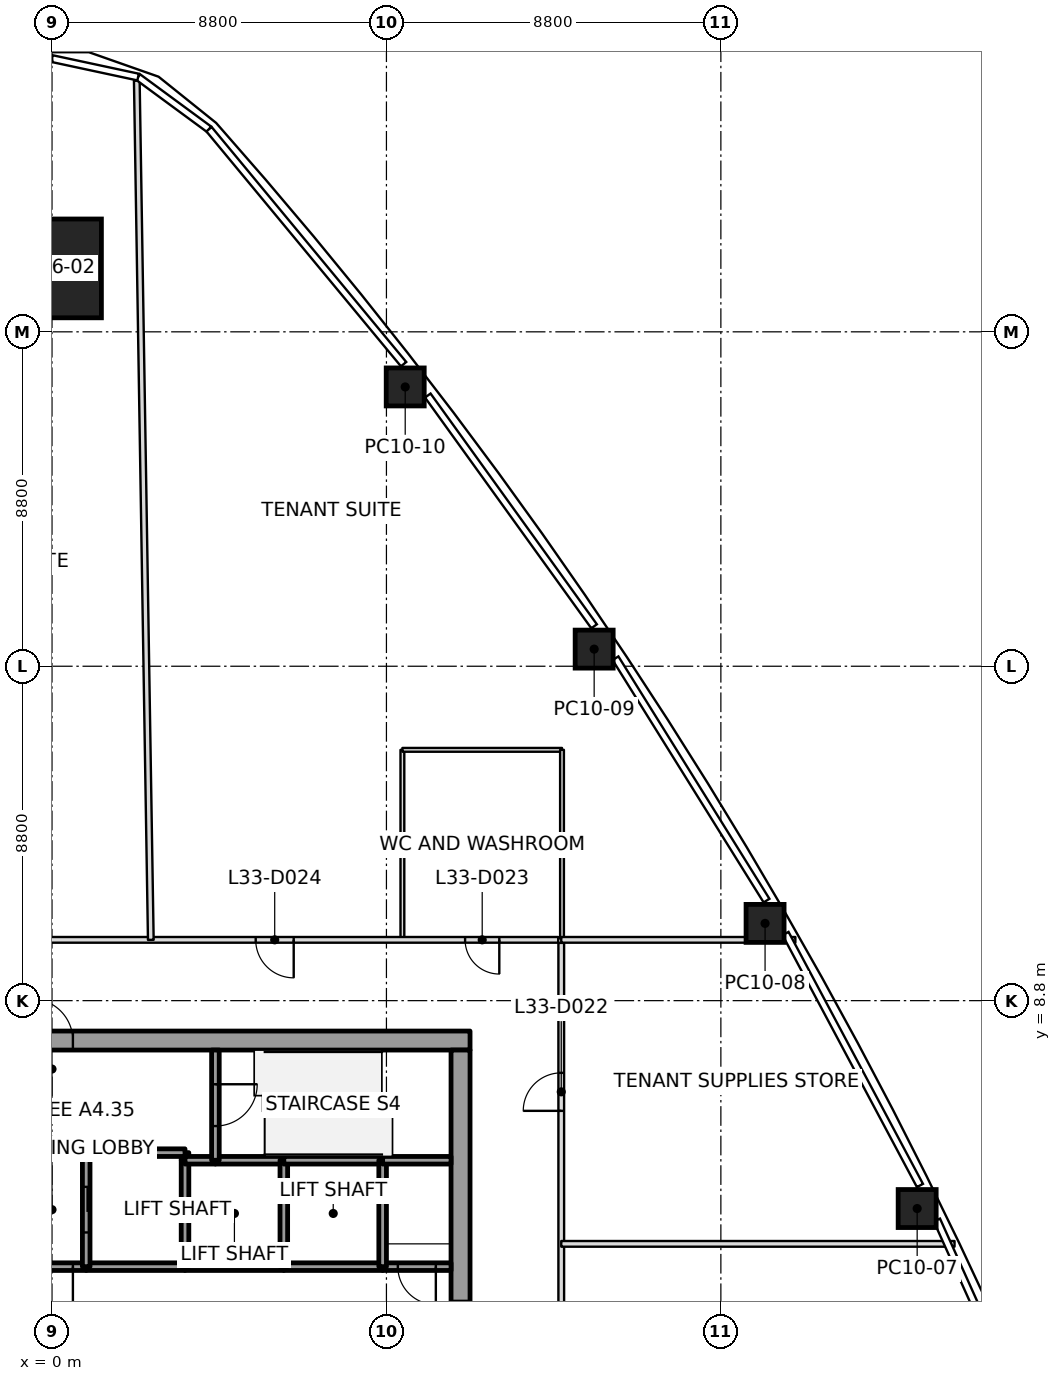
"""IFC4 building model, lengths in metres.
Left out: names, types, materials, properties, quantities, classifications, styles, units other than length and angle.
Written with IfcOpenShell. Run it as: python <this file> out.ifc"""

import sys

from ifc_helpers import new_model, si_unit, direction, frame, frame_2d, origin, origin_2d, place, context, subcontext, project, spatial, rectangle, extrude, element, fill, save


model = new_model("IFC4")
c1 = context("Model", 3, precision=1e-05, world=origin(), true_north=direction((0.0, 1.0)))
c2 = subcontext(c1, "Body", "Model", "MODEL_VIEW")
j1 = project(units=[si_unit("LENGTHUNIT", "METRE"), si_unit("PLANEANGLEUNIT", "RADIAN")], contexts=[c1])
p1 = place(None, origin())
s1 = spatial("IfcSite", under=j1, at=p1, CompositionType="ELEMENT")
p2 = place(p1, origin())
s2 = spatial("IfcBuilding", under=s1, at=p2, CompositionType="ELEMENT")
p3 = place(p2, frame((0.0, 0.0, 153.8)))
s3 = spatial("IfcBuildingStorey", under=s2, at=p3, CompositionType="ELEMENT", Elevation=153.8)
p4 = place(p3, frame((0.0, 28.069, 0.0), z_axis=(0.0, -0.032453598962, 0.999473243221), x_axis=(1.0, 0.0, 0.0)))
e1 = element("IfcColumn", 1, at=p4, inside=s3, PredefinedType="COLUMN", context=c2, shape_type="SweptSolid", body=[
    extrude(rectangle(XDim=2.6, YDim=2.6, at=origin_2d()), origin(), (0.0, 0.0, 1.0), 4.002),
])
p5 = place(p3, frame((22.765, 3.329, 0.0), z_axis=(-0.014097689605, 0.002074984617, 0.999898469639), x_axis=(-0.440645983908, 0.897644641837, -0.00807550904)))
e2 = element("IfcColumn", 2, at=p5, inside=s3, PredefinedType="COLUMN", context=c2, shape_type="SweptSolid", body=[
    extrude(rectangle(XDim=1.0, YDim=1.0, at=origin_2d()), origin(), (0.0, 0.0, 1.0), 4.0),
])
p6 = place(p3, frame((18.763, 10.833, 0.0), z_axis=(-0.009948074445, -0.005736926367, 0.999934059571), x_axis=(-0.499975258342, 0.8660396879, -5.385525e-06)))
e3 = element("IfcColumn", 3, at=p6, inside=s3, PredefinedType="COLUMN", context=c2, shape_type="SweptSolid", body=[
    extrude(rectangle(XDim=1.0, YDim=1.0, at=origin_2d()), origin(), (0.0, 0.0, 1.0), 4.0),
])
p7 = place(p3, frame((14.266, 18.051, 0.0), z_axis=(-0.005248490815, -0.013243284963, 0.999898529226), x_axis=(-0.557043340831, 0.830444164861, 0.008074991239)))
e4 = element("IfcColumn", 4, at=p7, inside=s3, PredefinedType="COLUMN", context=c2, shape_type="SweptSolid", body=[
    extrude(rectangle(XDim=1.0, YDim=1.0, at=origin_2d()), origin(), (0.0, 0.0, 1.0), 4.0),
])
p8 = place(p3, frame((9.294, 24.95, 0.0), z_axis=(-0.000183066973, -0.020503501027, 0.999789764367), x_axis=(-0.611585028009, 0.79101467846, 0.016109996147)))
e5 = element("IfcColumn", 5, at=p8, inside=s3, PredefinedType="COLUMN", context=c2, shape_type="SweptSolid", body=[
    extrude(rectangle(XDim=1.0, YDim=1.0, at=origin_2d()), origin(), (0.0, 0.0, 1.0), 4.001),
])
p9 = place(p3, frame((-11.0, 7.75, 0.0), z_axis=(0.0, 0.0, 1.0), x_axis=(1.0, 0.0, 0.0)))
e6 = element("IfcWall", 6, at=p9, inside=s3, PredefinedType="SHEAR", context=c2, shape_type="SweptSolid", body=[
    extrude(rectangle(XDim=22.0, YDim=0.5, at=frame_2d((11.0, 0.0))), origin(), (0.0, 0.0, 1.0), 4.0),
])
p10 = place(p9, frame((10.45, 0.0, 0.0)))
e7 = element("IfcOpeningElement", 7, at=p10, cuts=e6, PredefinedType="OPENING", context=c2, shape_type="SweptSolid", body=[
    extrude(rectangle(XDim=1.1, YDim=2.1, at=frame_2d((0.55, 1.05))), frame((0.0, 0.25, 0.0), z_axis=(0.0, -1.0, 0.0), x_axis=(1.0, 0.0, 0.0)), (0.0, 0.0, 1.0), 0.5),
])
p11 = place(p3, frame((10.75, -7.5, 0.0), z_axis=(0.0, 0.0, 1.0), x_axis=(0.0, 1.0, 0.0)))
e8 = element("IfcWall", 8, at=p11, inside=s3, PredefinedType="SHEAR", context=c2, shape_type="SweptSolid", body=[
    extrude(rectangle(XDim=15.0, YDim=0.5, at=frame_2d((7.5, 0.0))), origin(), (0.0, 0.0, 1.0), 4.0),
])
p12 = place(p11, frame((6.6, 0.0, 0.0)))
e9 = element("IfcOpeningElement", 9, at=p12, cuts=e8, PredefinedType="OPENING", context=c2, shape_type="SweptSolid", body=[
    extrude(rectangle(XDim=1.8, YDim=2.1, at=frame_2d((0.9, 1.05))), frame((0.0, 0.25, 0.0), z_axis=(0.0, -1.0, 0.0), x_axis=(1.0, 0.0, 0.0)), (0.0, 0.0, 1.0), 0.5),
])
p13 = place(p3, frame((0.9, 1.8, 0.0), z_axis=(0.0, 0.0, 1.0), x_axis=(-1.0, 0.0, 0.0)))
e10 = element("IfcWall", 10, at=p13, inside=s3, PredefinedType="SOLIDWALL", context=c2, shape_type="SweptSolid", body=[
    extrude(rectangle(XDim=1.8, YDim=0.2, at=frame_2d((0.9, 0.0))), origin(), (0.0, 0.0, 1.0), 3.85),
])
p14 = place(p13, frame((0.35, 0.0, 0.0)))
e11 = element("IfcOpeningElement", 11, at=p14, cuts=e10, PredefinedType="OPENING", context=c2, shape_type="SweptSolid", body=[
    extrude(rectangle(XDim=1.1, YDim=2.1, at=frame_2d((0.55, 1.05))), frame((0.0, 0.1, 0.0), z_axis=(0.0, -1.0, 0.0), x_axis=(1.0, 0.0, 0.0)), (0.0, 0.0, 1.0), 0.2),
])
p15 = place(p3, frame((3.5, 1.8, 0.0), z_axis=(0.0, 0.0, 1.0), x_axis=(-1.0, 0.0, 0.0)))
e12 = element("IfcWall", 12, at=p15, inside=s3, PredefinedType="SOLIDWALL", context=c2, shape_type="SweptSolid", body=[
    extrude(rectangle(XDim=2.6, YDim=0.2, at=frame_2d((1.3, 0.0))), origin(), (0.0, 0.0, 1.0), 3.85),
])
p16 = place(p3, frame((3.5, 4.6, 0.0), z_axis=(0.0, 0.0, 1.0), x_axis=(0.0, 1.0, 0.0)))
e13 = element("IfcWall", 13, at=p16, inside=s3, PredefinedType="SOLIDWALL", context=c2, shape_type="SweptSolid", body=[
    extrude(rectangle(XDim=0.2, YDim=0.2, at=frame_2d((0.1, 0.0))), origin(), (0.0, 0.0, 1.0), 3.85),
])
p17 = place(p3, frame((3.5, 4.8, 0.0), z_axis=(0.0, 0.0, 1.0), x_axis=(-1.0, 0.0, 0.0)))
e14 = element("IfcWall", 14, at=p17, inside=s3, PredefinedType="SOLIDWALL", context=c2, shape_type="SweptSolid", body=[
    extrude(rectangle(XDim=2.6, YDim=0.2, at=frame_2d((1.3, 0.0))), origin(), (0.0, 0.0, 1.0), 3.85),
])
p18 = place(p3, frame((0.9, 4.8, 0.0), z_axis=(0.0, 0.0, 1.0), x_axis=(0.0, -1.0, 0.0)))
e15 = element("IfcWall", 15, at=p18, inside=s3, PredefinedType="SOLIDWALL", context=c2, shape_type="SweptSolid", body=[
    extrude(rectangle(XDim=3.0, YDim=0.2, at=frame_2d((1.5, 0.0))), origin(), (0.0, 0.0, 1.0), 3.85),
])
p19 = place(p18, frame((0.9, 0.0, 0.0)))
e16 = element("IfcOpeningElement", 16, at=p19, cuts=e15, PredefinedType="OPENING", context=c2, shape_type="SweptSolid", body=[
    extrude(rectangle(XDim=1.2, YDim=2.1, at=frame_2d((0.6, 1.05))), frame((0.0, 0.1, 0.0), z_axis=(0.0, -1.0, 0.0), x_axis=(1.0, 0.0, 0.0)), (0.0, 0.0, 1.0), 0.2),
])
p20 = place(p3, frame((6.1, 1.8, 0.0), z_axis=(0.0, 0.0, 1.0), x_axis=(-1.0, 0.0, 0.0)))
e17 = element("IfcWall", 17, at=p20, inside=s3, PredefinedType="SOLIDWALL", context=c2, shape_type="SweptSolid", body=[
    extrude(rectangle(XDim=2.6, YDim=0.2, at=frame_2d((1.3, 0.0))), origin(), (0.0, 0.0, 1.0), 3.85),
])
p21 = place(p3, frame((3.5, 1.8, 0.0), z_axis=(0.0, 0.0, 1.0), x_axis=(0.0, 1.0, 0.0)))
e18 = element("IfcWall", 18, at=p21, inside=s3, PredefinedType="SOLIDWALL", context=c2, shape_type="SweptSolid", body=[
    extrude(rectangle(XDim=2.8, YDim=0.2, at=frame_2d((1.4, 0.0))), origin(), (0.0, 0.0, 1.0), 3.85),
])
p22 = place(p3, frame((4.3, 4.6, 0.0), z_axis=(0.0, 0.0, 1.0), x_axis=(-1.0, 0.0, 0.0)))
e19 = element("IfcWall", 19, at=p22, inside=s3, PredefinedType="SOLIDWALL", context=c2, shape_type="SweptSolid", body=[
    extrude(rectangle(XDim=0.8, YDim=0.2, at=frame_2d((0.4, 0.0))), origin(), (0.0, 0.0, 1.0), 3.85),
])
p23 = place(p3, frame((6.1, 4.6, 0.0), z_axis=(0.0, 0.0, 1.0), x_axis=(-1.0, 0.0, 0.0)))
e20 = element("IfcWall", 20, at=p23, inside=s3, PredefinedType="SOLIDWALL", context=c2, shape_type="SweptSolid", body=[
    extrude(rectangle(XDim=1.8, YDim=0.2, at=frame_2d((0.9, 0.0))), origin(), (0.0, 0.0, 1.0), 3.85),
])
p24 = place(p3, frame((4.3, 7.5, 0.0), z_axis=(0.0, 0.0, 1.0), x_axis=(0.0, -1.0, 0.0)))
e21 = element("IfcWall", 21, at=p24, inside=s3, PredefinedType="SOLIDWALL", context=c2, shape_type="SweptSolid", body=[
    extrude(rectangle(XDim=2.9, YDim=0.2, at=frame_2d((1.45, 0.0))), origin(), (0.0, 0.0, 1.0), 3.85),
])
p25 = place(p24, frame((0.9, 0.0, 0.0)))
e22 = element("IfcOpeningElement", 22, at=p25, cuts=e21, PredefinedType="OPENING", context=c2, shape_type="SweptSolid", body=[
    extrude(rectangle(XDim=1.1, YDim=2.1, at=frame_2d((0.55, 1.05))), frame((0.0, 0.1, 0.0), z_axis=(0.0, -1.0, 0.0), x_axis=(1.0, 0.0, 0.0)), (0.0, 0.0, 1.0), 0.2),
])
p26 = place(p3, frame((8.7, 1.8, 0.0), z_axis=(0.0, 0.0, 1.0), x_axis=(-1.0, 0.0, 0.0)))
e23 = element("IfcWall", 23, at=p26, inside=s3, PredefinedType="SOLIDWALL", context=c2, shape_type="SweptSolid", body=[
    extrude(rectangle(XDim=2.6, YDim=0.2, at=frame_2d((1.3, 0.0))), origin(), (0.0, 0.0, 1.0), 3.85),
])
p27 = place(p3, frame((6.1, 1.8, 0.0), z_axis=(0.0, 0.0, 1.0), x_axis=(0.0, 1.0, 0.0)))
e24 = element("IfcWall", 24, at=p27, inside=s3, PredefinedType="SOLIDWALL", context=c2, shape_type="SweptSolid", body=[
    extrude(rectangle(XDim=2.8, YDim=0.2, at=frame_2d((1.4, 0.0))), origin(), (0.0, 0.0, 1.0), 3.85),
])
p28 = place(p3, frame((8.7, 4.6, 0.0), z_axis=(0.0, 0.0, 1.0), x_axis=(-1.0, 0.0, 0.0)))
e25 = element("IfcWall", 25, at=p28, inside=s3, PredefinedType="SOLIDWALL", context=c2, shape_type="SweptSolid", body=[
    extrude(rectangle(XDim=2.6, YDim=0.2, at=frame_2d((1.3, 0.0))), origin(), (0.0, 0.0, 1.0), 3.85),
])
p29 = place(p3, frame((10.5, 1.8, 0.0), z_axis=(0.0, 0.0, 1.0), x_axis=(-1.0, 0.0, 0.0)))
e26 = element("IfcWall", 26, at=p29, inside=s3, PredefinedType="SOLIDWALL", context=c2, shape_type="SweptSolid", body=[
    extrude(rectangle(XDim=1.8, YDim=0.2, at=frame_2d((0.9, 0.0))), origin(), (0.0, 0.0, 1.0), 3.85),
])
p30 = place(p29, frame((0.4, 0.0, 0.0)))
e27 = element("IfcOpeningElement", 27, at=p30, cuts=e26, PredefinedType="OPENING", context=c2, shape_type="SweptSolid", body=[
    extrude(rectangle(XDim=1.0, YDim=2.1, at=frame_2d((0.5, 1.05))), frame((0.0, 0.1, 0.0), z_axis=(0.0, -1.0, 0.0), x_axis=(1.0, 0.0, 0.0)), (0.0, 0.0, 1.0), 0.2),
])
p31 = place(p3, frame((8.7, 4.6, 0.0), z_axis=(0.0, 0.0, 1.0), x_axis=(0.0, -1.0, 0.0)))
e28 = element("IfcWall", 28, at=p31, inside=s3, PredefinedType="SOLIDWALL", context=c2, shape_type="SweptSolid", body=[
    extrude(rectangle(XDim=2.8, YDim=0.2, at=frame_2d((1.4, 0.0))), origin(), (0.0, 0.0, 1.0), 3.85),
])
p32 = place(p3, frame((10.5, 4.6, 0.0), z_axis=(0.0, 0.0, 1.0), x_axis=(-1.0, 0.0, 0.0)))
e29 = element("IfcWall", 29, at=p32, inside=s3, PredefinedType="SOLIDWALL", context=c2, shape_type="SweptSolid", body=[
    extrude(rectangle(XDim=1.8, YDim=0.2, at=frame_2d((0.9, 0.0))), origin(), (0.0, 0.0, 1.0), 3.85),
])
p33 = place(p3, frame((2.6, 10.4, 0.0), z_axis=(0.0, 0.0, 1.0), x_axis=(-0.016312152696, 0.999866947986, 0.0)))
e30 = element("IfcWall", 30, at=p33, inside=s3, PredefinedType="PARTITIONING", context=c2, shape_type="SweptSolid", body=[
    extrude(rectangle(XDim=22.615, YDim=0.15, at=frame_2d((11.307, 0.0))), origin(), (0.0, 0.0, 1.0), 3.084),
])
p34 = place(p3, frame((23.749, 2.4, 0.0), z_axis=(0.0, 0.0, 1.0), x_axis=(-1.0, 0.0, 0.0)))
e31 = element("IfcWall", 31, at=p34, inside=s3, PredefinedType="PARTITIONING", context=c2, shape_type="SweptSolid", body=[
    extrude(rectangle(XDim=10.349, YDim=0.15, at=frame_2d((5.174, 0.0))), origin(), (0.0, 0.0, 1.0), 3.234),
])
p35 = place(p3, frame((13.4, 10.4, 0.0), z_axis=(0.0, 0.0, 1.0), x_axis=(1.0, 0.0, 0.0)))
e32 = element("IfcWall", 32, at=p35, inside=s3, PredefinedType="PARTITIONING", context=c2, shape_type="SweptSolid", body=[
    extrude(rectangle(XDim=6.16, YDim=0.15, at=frame_2d((3.08, 0.0))), origin(), (0.0, 0.0, 1.0), 3.084),
])
p36 = place(p3, frame((13.32, 10.4, 0.0), z_axis=(0.0, 0.0, 1.0), x_axis=(-1.0, 0.0, 0.0)))
e33 = element("IfcWall", 33, at=p36, inside=s3, PredefinedType="PARTITIONING", context=c2, shape_type="SweptSolid", body=[
    extrude(rectangle(XDim=26.64, YDim=0.15, at=frame_2d((13.32, 0.0))), origin(), (0.0, 0.0, 1.0), 3.097),
])
p37 = place(p36, frame((1.55, 0.0, 0.0)))
e34 = element("IfcOpeningElement", 34, at=p37, cuts=e33, PredefinedType="OPENING", context=c2, shape_type="SweptSolid", body=[
    extrude(rectangle(XDim=0.9, YDim=2.1, at=frame_2d((0.45, 1.05))), frame((0.0, 0.075, 0.0), z_axis=(0.0, -1.0, 0.0), x_axis=(1.0, 0.0, 0.0)), (0.0, 0.0, 1.0), 0.15),
])
p38 = place(p36, frame((6.96, 0.0, 0.0)))
e35 = element("IfcOpeningElement", 35, at=p38, cuts=e33, PredefinedType="OPENING", context=c2, shape_type="SweptSolid", body=[
    extrude(rectangle(XDim=1.0, YDim=2.1, at=frame_2d((0.5, 1.05))), frame((0.0, 0.075, 0.0), z_axis=(0.0, -1.0, 0.0), x_axis=(1.0, 0.0, 0.0)), (0.0, 0.0, 1.0), 0.15),
])
p39 = place(p36, frame((14.22, 0.0, 0.0)))
e36 = element("IfcOpeningElement", 36, at=p39, cuts=e33, PredefinedType="OPENING", context=c2, shape_type="SweptSolid", body=[
    extrude(rectangle(XDim=1.0, YDim=2.1, at=frame_2d((0.5, 1.05))), frame((0.0, 0.075, 0.0), z_axis=(0.0, -1.0, 0.0), x_axis=(1.0, 0.0, 0.0)), (0.0, 0.0, 1.0), 0.15),
])
p40 = place(p36, frame((22.23, 0.0, 0.0)))
e37 = element("IfcOpeningElement", 37, at=p40, cuts=e33, PredefinedType="OPENING", context=c2, shape_type="SweptSolid", body=[
    extrude(rectangle(XDim=1.0, YDim=2.1, at=frame_2d((0.5, 1.05))), frame((0.0, 0.075, 0.0), z_axis=(0.0, -1.0, 0.0), x_axis=(1.0, 0.0, 0.0)), (0.0, 0.0, 1.0), 0.15),
])
p41 = place(p3, frame((13.4, -10.32, 0.0), z_axis=(0.0, 0.0, 1.0), x_axis=(0.0, 1.0, 0.0)))
e38 = element("IfcWall", 38, at=p41, inside=s3, PredefinedType="PARTITIONING", context=c2, shape_type="SweptSolid", body=[
    extrude(rectangle(XDim=20.64, YDim=0.15, at=frame_2d((10.32, 0.0))), origin(), (0.0, 0.0, 1.0), 3.166),
])
p42 = place(p41, frame((16.22, 0.0, 0.0)))
e39 = element("IfcOpeningElement", 39, at=p42, cuts=e38, PredefinedType="OPENING", context=c2, shape_type="SweptSolid", body=[
    extrude(rectangle(XDim=1.0, YDim=2.1, at=frame_2d((0.5, 1.05))), frame((0.0, 0.075, 0.0), z_axis=(0.0, -1.0, 0.0), x_axis=(1.0, 0.0, 0.0)), (0.0, 0.0, 1.0), 0.15),
])
p43 = place(p41, frame((0.95, 0.0, 0.0)))
e40 = element("IfcOpeningElement", 40, at=p43, cuts=e38, PredefinedType="OPENING", context=c2, shape_type="SweptSolid", body=[
    extrude(rectangle(XDim=0.9, YDim=2.1, at=frame_2d((0.45, 1.05))), frame((0.0, 0.075, 0.0), z_axis=(0.0, -1.0, 0.0), x_axis=(1.0, 0.0, 0.0)), (0.0, 0.0, 1.0), 0.15),
])
p44 = place(p41, frame((3.36, 0.0, 0.0)))
e41 = element("IfcOpeningElement", 41, at=p44, cuts=e38, PredefinedType="OPENING", context=c2, shape_type="SweptSolid", body=[
    extrude(rectangle(XDim=1.0, YDim=2.1, at=frame_2d((0.5, 1.05))), frame((0.0, 0.075, 0.0), z_axis=(0.0, -1.0, 0.0), x_axis=(1.0, 0.0, 0.0)), (0.0, 0.0, 1.0), 0.15),
])
p45 = place(p41, frame((8.22, 0.0, 0.0)))
e42 = element("IfcOpeningElement", 42, at=p45, cuts=e38, PredefinedType="OPENING", context=c2, shape_type="SweptSolid", body=[
    extrude(rectangle(XDim=1.0, YDim=2.1, at=frame_2d((0.5, 1.05))), frame((0.0, 0.075, 0.0), z_axis=(0.0, -1.0, 0.0), x_axis=(1.0, 0.0, 0.0)), (0.0, 0.0, 1.0), 0.15),
])
p46 = place(p3, frame((9.22, 10.43, 0.0), z_axis=(0.0, 0.0, 1.0), x_axis=(0.0, 1.0, 0.0)))
e43 = element("IfcWall", 43, at=p46, inside=s3, PredefinedType="PARTITIONING", context=c2, shape_type="SweptSolid", body=[
    extrude(rectangle(XDim=4.97, YDim=0.1, at=frame_2d((2.485, 0.0))), origin(), (0.0, 0.0, 1.0), 3.097),
])
p47 = place(p3, frame((9.22, 15.4, 0.0), z_axis=(0.0, 0.0, 1.0), x_axis=(1.0, 0.0, 0.0)))
e44 = element("IfcWall", 44, at=p47, inside=s3, PredefinedType="PARTITIONING", context=c2, shape_type="SweptSolid", body=[
    extrude(rectangle(XDim=4.2, YDim=0.1, at=frame_2d((2.1, 0.0))), origin(), (0.0, 0.0, 1.0), 3.3),
])
p48 = place(p3, frame((13.42, 15.4, 0.0), z_axis=(0.0, 0.0, 1.0), x_axis=(0.0, -1.0, 0.0)))
e45 = element("IfcWall", 45, at=p48, inside=s3, PredefinedType="PARTITIONING", context=c2, shape_type="SweptSolid", body=[
    extrude(rectangle(XDim=4.97, YDim=0.1, at=frame_2d((2.485, 0.0))), origin(), (0.0, 0.0, 1.0), 3.097),
])
p49 = place(p42, origin())
e46 = element("IfcDoor", 46, at=p49, inside=s3, OperationType="SINGLE_SWING_RIGHT", PredefinedType="DOOR", context=c2, shape_type="SweptSolid", body=[
    extrude(rectangle(XDim=1.0, YDim=2.1, at=frame_2d((0.5, 1.05))), frame((0.0, 0.025, 0.0), z_axis=(0.0, -1.0, 0.0), x_axis=(1.0, 0.0, 0.0)), (0.0, 0.0, 1.0), 0.05),
])
fill(e39, e46)
p50 = place(p37, origin())
e47 = element("IfcDoor", 47, at=p50, inside=s3, OperationType="SINGLE_SWING_RIGHT", PredefinedType="DOOR", context=c2, shape_type="SweptSolid", body=[
    extrude(rectangle(XDim=0.9, YDim=2.1, at=frame_2d((0.45, 1.05))), frame((0.0, 0.025, 0.0), z_axis=(0.0, -1.0, 0.0), x_axis=(1.0, 0.0, 0.0)), (0.0, 0.0, 1.0), 0.05),
])
fill(e34, e47)
p51 = place(p38, origin())
e48 = element("IfcDoor", 48, at=p51, inside=s3, OperationType="SINGLE_SWING_LEFT", PredefinedType="DOOR", context=c2, shape_type="SweptSolid", body=[
    extrude(rectangle(XDim=1.0, YDim=2.1, at=frame_2d((0.5, 1.05))), frame((0.0, 0.025, 0.0), z_axis=(0.0, -1.0, 0.0), x_axis=(1.0, 0.0, 0.0)), (0.0, 0.0, 1.0), 0.05),
])
fill(e35, e48)
p52 = place(p19, origin())
e49 = element("IfcDoor", 49, at=p52, inside=s3, OperationType="SLIDING_TO_LEFT", PredefinedType="DOOR", context=c2, shape_type="SweptSolid", body=[
    extrude(rectangle(XDim=1.2, YDim=2.1, at=frame_2d((0.6, 1.05))), frame((0.0, 0.025, 0.0), z_axis=(0.0, -1.0, 0.0), x_axis=(1.0, 0.0, 0.0)), (0.0, 0.0, 1.0), 0.05),
])
fill(e16, e49)
p53 = place(p14, origin())
e50 = element("IfcDoor", 50, at=p53, inside=s3, OperationType="SINGLE_SWING_LEFT", PredefinedType="DOOR", context=c2, shape_type="SweptSolid", body=[
    extrude(rectangle(XDim=1.1, YDim=2.1, at=frame_2d((0.55, 1.05))), frame((0.0, 0.025, 0.0), z_axis=(0.0, -1.0, 0.0), x_axis=(1.0, 0.0, 0.0)), (0.0, 0.0, 1.0), 0.05),
])
fill(e11, e50)
p54 = place(p30, origin())
e51 = element("IfcDoor", 51, at=p54, inside=s3, OperationType="SINGLE_SWING_RIGHT", PredefinedType="DOOR", context=c2, shape_type="SweptSolid", body=[
    extrude(rectangle(XDim=1.0, YDim=2.1, at=frame_2d((0.5, 1.05))), frame((0.0, 0.025, 0.0), z_axis=(0.0, -1.0, 0.0), x_axis=(1.0, 0.0, 0.0)), (0.0, 0.0, 1.0), 0.05),
])
fill(e27, e51)
p55 = place(p25, origin())
e52 = element("IfcDoor", 52, at=p55, inside=s3, OperationType="SINGLE_SWING_RIGHT", PredefinedType="DOOR", context=c2, shape_type="SweptSolid", body=[
    extrude(rectangle(XDim=1.1, YDim=2.1, at=frame_2d((0.55, 1.05))), frame((0.0, 0.025, 0.0), z_axis=(0.0, -1.0, 0.0), x_axis=(1.0, 0.0, 0.0)), (0.0, 0.0, 1.0), 0.05),
])
fill(e22, e52)
p56 = place(p12, origin())
e53 = element("IfcDoor", 53, at=p56, inside=s3, OperationType="DOUBLE_DOOR_SINGLE_SWING", PredefinedType="DOOR", context=c2, shape_type="SweptSolid", body=[
    extrude(rectangle(XDim=1.8, YDim=2.1, at=frame_2d((0.9, 1.05))), frame((0.0, 0.025, 0.0), z_axis=(0.0, -1.0, 0.0), x_axis=(1.0, 0.0, 0.0)), (0.0, 0.0, 1.0), 0.05),
])
fill(e9, e53)
p57 = place(p10, origin())
e54 = element("IfcDoor", 54, at=p57, inside=s3, OperationType="SINGLE_SWING_RIGHT", PredefinedType="DOOR", context=c2, shape_type="SweptSolid", body=[
    extrude(rectangle(XDim=1.1, YDim=2.1, at=frame_2d((0.55, 1.05))), frame((0.0, 0.025, 0.0), z_axis=(0.0, -1.0, 0.0), x_axis=(1.0, 0.0, 0.0)), (0.0, 0.0, 1.0), 0.05),
])
fill(e7, e54)
save(model, sys.argv[1])
